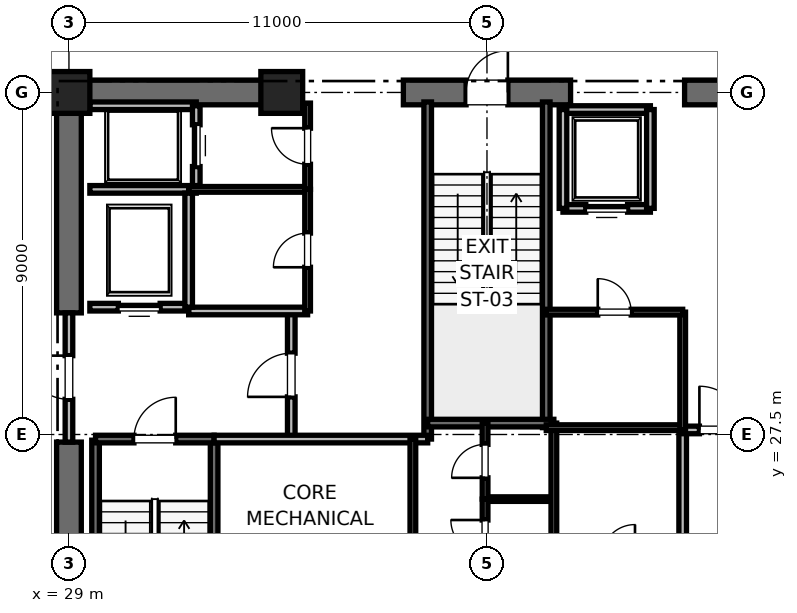
"""IFC4 building model, lengths in metres.
Left out: names, types, materials, properties, quantities, classifications, styles, units other than length and angle.
Written with IfcOpenShell. Run it as: python <this file> out.ifc"""

import sys

from ifc_helpers import new_model, si_unit, direction, frame, frame_2d, origin, origin_2d, place, context, subcontext, project, spatial, rectangle, extrude, element, fill, save


model = new_model("IFC4")
c1 = context("Model", 3, precision=1e-05, world=origin(), true_north=direction((0.0, 1.0)))
c2 = subcontext(c1, "Body", "Model", "MODEL_VIEW")
j1 = project(units=[si_unit("LENGTHUNIT", "METRE"), si_unit("PLANEANGLEUNIT", "RADIAN")], contexts=[c1])
p1 = place(None, origin())
s1 = spatial("IfcSite", under=j1, at=p1, CompositionType="ELEMENT")
p2 = place(p1, origin())
s2 = spatial("IfcBuilding", under=s1, at=p2, CompositionType="ELEMENT")
p3 = place(p2, frame((0.0, 0.0, -9.0)))
s3 = spatial("IfcBuildingStorey", under=s2, at=p3, CompositionType="ELEMENT", Elevation=-9.0)
for number, where, z_axis, x_axis in (
    (1, (29.0, 36.5, -0.3), (0.0, 0.0, 1.0), (1.0, 0.0, 0.0)),
    (2, (34.6, 36.5, -0.3), (0.0, 0.0, 1.0), (1.0, 0.0, 0.0)),
):
    element("IfcColumn", number, at=place(p3, frame(where, z_axis=z_axis, x_axis=x_axis)), inside=s3, PredefinedType="PILASTER", context=c2, shape_type="SweptSolid", body=[
        extrude(rectangle(XDim=1.1, YDim=1.1, at=origin_2d()), origin(), (0.0, 0.0, 1.0), 4.8),
    ])
p4 = place(p3, frame((29.0, 36.5, -0.3), z_axis=(0.0, 0.0, 1.0), x_axis=(1.0, 0.0, 0.0)))
e3 = element("IfcWall", 3, at=p4, inside=s3, PredefinedType="SHEAR", context=c2, shape_type="SweptSolid", body=[
    extrude(rectangle(XDim=5.8, YDim=0.65, at=frame_2d((2.9, 0.0))), origin(), (0.0, 0.0, 1.0), 4.5),
])
p5 = place(p3, frame((37.8, 36.5, -0.3), z_axis=(0.0, 0.0, 1.0), x_axis=(1.0, 0.0, 0.0)))
e4 = element("IfcWall", 4, at=p5, inside=s3, PredefinedType="SHEAR", context=c2, shape_type="SweptSolid", body=[
    extrude(rectangle(XDim=4.4, YDim=0.65, at=frame_2d((2.2, 0.0))), origin(), (0.0, 0.0, 1.0), 4.5),
])
p6 = place(p5, frame((1.65, 0.0, 0.3)))
e5 = element("IfcOpeningElement", 5, at=p6, cuts=e4, PredefinedType="OPENING", context=c2, shape_type="SweptSolid", body=[
    extrude(rectangle(XDim=1.1, YDim=2.15, at=frame_2d((0.55, 1.075))), frame((0.0, 0.325, 0.0), z_axis=(0.0, -1.0, 0.0), x_axis=(1.0, 0.0, 0.0)), (0.0, 0.0, 1.0), 0.65),
])
p7 = place(p3, frame((45.2, 36.5, -0.3), z_axis=(0.0, 0.0, 1.0), x_axis=(1.0, 0.0, 0.0)))
e6 = element("IfcWall", 6, at=p7, inside=s3, PredefinedType="SHEAR", context=c2, shape_type="SweptSolid", body=[
    extrude(rectangle(XDim=5.8, YDim=0.65, at=frame_2d((2.9, 0.0))), origin(), (0.0, 0.0, 1.0), 4.5),
])
p8 = place(p3, frame((29.0, 18.5, -0.3), z_axis=(0.0, 0.0, 1.0), x_axis=(0.0, 1.0, 0.0)))
e7 = element("IfcWall", 7, at=p8, inside=s3, PredefinedType="SHEAR", context=c2, shape_type="SweptSolid", body=[
    extrude(rectangle(XDim=8.8, YDim=0.65, at=frame_2d((4.4, 0.0))), origin(), (0.0, 0.0, 1.0), 4.5),
])
p9 = place(p3, frame((29.0, 30.7, -0.3), z_axis=(0.0, 0.0, 1.0), x_axis=(0.0, 1.0, 0.0)))
e8 = element("IfcWall", 8, at=p9, inside=s3, PredefinedType="SHEAR", context=c2, shape_type="SweptSolid", body=[
    extrude(rectangle(XDim=5.8, YDim=0.65, at=frame_2d((2.9, 0.0))), origin(), (0.0, 0.0, 1.0), 4.5),
])
p10 = place(p3, frame((29.7, 19.2, -0.3), z_axis=(0.0, 0.0, 1.0), x_axis=(0.0, 1.0, 0.0)))
e9 = element("IfcWall", 9, at=p10, inside=s3, PredefinedType="SOLIDWALL", context=c2, shape_type="SweptSolid", body=[
    extrude(rectangle(XDim=8.15, YDim=0.2, at=frame_2d((4.075, 0.0))), origin(), (0.0, 0.0, 1.0), 4.5),
])
p11 = place(p3, frame((32.82, 18.6, -0.3), z_axis=(0.0, 0.0, 1.0), x_axis=(0.0, 1.0, 0.0)))
e10 = element("IfcWall", 10, at=p11, inside=s3, PredefinedType="SOLIDWALL", context=c2, shape_type="SweptSolid", body=[
    extrude(rectangle(XDim=8.78, YDim=0.2, at=frame_2d((4.39, 0.0))), origin(), (0.0, 0.0, 1.0), 4.5),
])
p12 = place(p3, frame((29.7, 27.38, -0.3), z_axis=(0.0, 0.0, 1.0), x_axis=(1.0, 0.0, 0.0)))
e11 = element("IfcWall", 11, at=p12, inside=s3, PredefinedType="SOLIDWALL", context=c2, shape_type="SweptSolid", body=[
    extrude(rectangle(XDim=3.12, YDim=0.2, at=frame_2d((1.56, 0.0))), origin(), (0.0, 0.0, 1.0), 4.5),
])
p13 = place(p12, frame((1.01, 0.0, 0.3)))
e12 = element("IfcOpeningElement", 12, at=p13, cuts=e11, PredefinedType="OPENING", context=c2, shape_type="SweptSolid", body=[
    extrude(rectangle(XDim=1.1, YDim=2.15, at=frame_2d((0.55, 1.075))), frame((0.0, 0.1, 0.0), z_axis=(0.0, -1.0, 0.0), x_axis=(1.0, 0.0, 0.0)), (0.0, 0.0, 1.0), 0.2),
])
p14 = place(p3, frame((38.44, 27.38, -0.3), z_axis=(0.0, 0.0, 1.0), x_axis=(0.0, 1.0, 0.0)))
e13 = element("IfcWall", 13, at=p14, inside=s3, PredefinedType="SOLIDWALL", context=c2, shape_type="SweptSolid", body=[
    extrude(rectangle(XDim=8.87, YDim=0.2, at=frame_2d((4.435, 0.0))), origin(), (0.0, 0.0, 1.0), 4.5),
])
p15 = place(p3, frame((41.56, 27.68, -0.3), z_axis=(0.0, 0.0, 1.0), x_axis=(0.0, 1.0, 0.0)))
e14 = element("IfcWall", 14, at=p15, inside=s3, PredefinedType="SOLIDWALL", context=c2, shape_type="SweptSolid", body=[
    extrude(rectangle(XDim=8.57, YDim=0.2, at=frame_2d((4.285, 0.0))), origin(), (0.0, 0.0, 1.0), 4.5),
])
p16 = place(p3, frame((38.44, 27.8, -0.3), z_axis=(0.0, 0.0, 1.0), x_axis=(1.0, 0.0, 0.0)))
e15 = element("IfcWall", 15, at=p16, inside=s3, PredefinedType="SOLIDWALL", context=c2, shape_type="SweptSolid", body=[
    extrude(rectangle(XDim=3.32, YDim=0.2, at=frame_2d((1.66, 0.0))), origin(), (0.0, 0.0, 1.0), 4.5),
])
p17 = place(p3, frame((34.85, 27.38, 0.0), z_axis=(0.0, 0.0, 1.0), x_axis=(0.0, 1.0, 0.0)))
e16 = element("IfcWall", 16, at=p17, inside=s3, PredefinedType="PARTITIONING", context=c2, shape_type="SweptSolid", body=[
    extrude(rectangle(XDim=3.37, YDim=0.2, at=frame_2d((1.685, 0.0))), origin(), (0.0, 0.0, 1.0), 4.2),
])
p18 = place(p17, frame((1.11, 0.0, 0.0)))
e17 = element("IfcOpeningElement", 17, at=p18, cuts=e16, PredefinedType="OPENING", context=c2, shape_type="SweptSolid", body=[
    extrude(rectangle(XDim=1.15, YDim=2.2, at=frame_2d((0.575, 1.1))), frame((0.0, 0.1, 0.0), z_axis=(0.0, -1.0, 0.0), x_axis=(1.0, 0.0, 0.0)), (0.0, 0.0, 1.0), 0.2),
])
p19 = place(p3, frame((29.0, 27.3, 0.0), z_axis=(0.0, 0.0, 1.0), x_axis=(0.0, 1.0, 0.0)))
e18 = element("IfcWall", 18, at=p19, inside=s3, PredefinedType="PARTITIONING", context=c2, shape_type="SweptSolid", body=[
    extrude(rectangle(XDim=3.4, YDim=0.2, at=frame_2d((1.7, 0.0))), origin(), (0.0, 0.0, 1.0), 2.98),
])
p20 = place(p19, frame((1.125, 0.0, 0.0)))
e19 = element("IfcOpeningElement", 19, at=p20, cuts=e18, PredefinedType="OPENING", context=c2, shape_type="SweptSolid", body=[
    extrude(rectangle(XDim=1.15, YDim=2.2, at=frame_2d((0.575, 1.1))), frame((0.0, 0.1, 0.0), z_axis=(0.0, -1.0, 0.0), x_axis=(1.0, 0.0, 0.0)), (0.0, 0.0, 1.0), 0.2),
])
p21 = place(p3, frame((32.82, 27.38, 0.0), z_axis=(0.0, 0.0, 1.0), x_axis=(1.0, 0.0, 0.0)))
e20 = element("IfcWall", 20, at=p21, inside=s3, PredefinedType="PARTITIONING", context=c2, shape_type="SweptSolid", body=[
    extrude(rectangle(XDim=5.62, YDim=0.2, at=frame_2d((2.81, 0.0))), origin(), (0.0, 0.0, 1.0), 4.2),
])
p22 = place(p3, frame((32.15, 30.75, 0.0), z_axis=(0.0, 0.0, 1.0), x_axis=(1.0, 0.0, 0.0)))
e21 = element("IfcWall", 21, at=p22, inside=s3, PredefinedType="PARTITIONING", context=c2, shape_type="SweptSolid", body=[
    extrude(rectangle(XDim=3.13, YDim=0.2, at=frame_2d((1.565, 0.0))), origin(), (0.0, 0.0, 1.0), 4.2),
])
p23 = place(p3, frame((45.15, 24.25, 0.0), z_axis=(0.0, 0.0, 1.0), x_axis=(0.0, 1.0, 0.0)))
e22 = element("IfcWall", 22, at=p23, inside=s3, PredefinedType="PARTITIONING", context=c2, shape_type="SweptSolid", body=[
    extrude(rectangle(XDim=3.37, YDim=0.2, at=frame_2d((1.685, 0.0))), origin(), (0.0, 0.0, 1.0), 4.2),
])
p24 = place(p3, frame((45.15, 27.62, 0.0), z_axis=(0.0, 0.0, 1.0), x_axis=(1.0, 0.0, 0.0)))
e23 = element("IfcWall", 23, at=p24, inside=s3, PredefinedType="PARTITIONING", context=c2, shape_type="SweptSolid", body=[
    extrude(rectangle(XDim=2.03, YDim=0.2, at=frame_2d((1.015, 0.0))), origin(), (0.0, 0.0, 1.0), 4.2),
])
p25 = place(p24, frame((0.44, 0.0, 0.0)))
e24 = element("IfcOpeningElement", 24, at=p25, cuts=e23, PredefinedType="OPENING", context=c2, shape_type="SweptSolid", body=[
    extrude(rectangle(XDim=1.15, YDim=2.2, at=frame_2d((0.575, 1.1))), frame((0.0, 0.1, 0.0), z_axis=(0.0, -1.0, 0.0), x_axis=(1.0, 0.0, 0.0)), (0.0, 0.0, 1.0), 0.2),
])
p26 = place(p3, frame((29.55, 30.85, 0.0), z_axis=(0.0, 0.0, 1.0), x_axis=(1.0, 0.0, 0.0)))
e25 = element("IfcWall", 25, at=p26, inside=s3, PredefinedType="SOLIDWALL", context=c2, shape_type="SweptSolid", body=[
    extrude(rectangle(XDim=2.6, YDim=0.2, at=frame_2d((1.3, 0.0))), origin(), (0.0, 0.0, 1.0), 2.98),
])
p27 = place(p26, frame((0.75, 0.0, 0.0)))
e26 = element("IfcOpeningElement", 26, at=p27, cuts=e25, PredefinedType="OPENING", context=c2, shape_type="SweptSolid", body=[
    extrude(rectangle(XDim=1.1, YDim=2.2, at=frame_2d((0.55, 1.1))), frame((0.0, 0.1, 0.0), z_axis=(0.0, -1.0, 0.0), x_axis=(1.0, 0.0, 0.0)), (0.0, 0.0, 1.0), 0.2),
])
p28 = place(p3, frame((29.55, 33.95, 0.0), z_axis=(0.0, 0.0, 1.0), x_axis=(1.0, 0.0, 0.0)))
e27 = element("IfcWall", 27, at=p28, inside=s3, PredefinedType="SOLIDWALL", context=c2, shape_type="SweptSolid", body=[
    extrude(rectangle(XDim=2.8, YDim=0.2, at=frame_2d((1.4, 0.0))), origin(), (0.0, 0.0, 1.0), 4.2),
])
p29 = place(p3, frame((32.15, 30.85, 0.0), z_axis=(0.0, 0.0, 1.0), x_axis=(0.0, 1.0, 0.0)))
e28 = element("IfcWall", 28, at=p29, inside=s3, PredefinedType="SOLIDWALL", context=c2, shape_type="SweptSolid", body=[
    extrude(rectangle(XDim=3.0, YDim=0.2, at=frame_2d((1.5, 0.0))), origin(), (0.0, 0.0, 1.0), 4.2),
])
p30 = place(p3, frame((32.35, 36.15, 0.0), z_axis=(0.0, 0.0, 1.0), x_axis=(-1.0, 0.0, 0.0)))
e29 = element("IfcWall", 29, at=p30, inside=s3, PredefinedType="SOLIDWALL", context=c2, shape_type="SweptSolid", body=[
    extrude(rectangle(XDim=2.8, YDim=0.2, at=frame_2d((1.4, 0.0))), origin(), (0.0, 0.0, 1.0), 3.38),
])
p31 = place(p3, frame((32.35, 34.05, 0.0), z_axis=(0.0, 0.0, 1.0), x_axis=(0.0, 1.0, 0.0)))
e30 = element("IfcWall", 30, at=p31, inside=s3, PredefinedType="SOLIDWALL", context=c2, shape_type="SweptSolid", body=[
    extrude(rectangle(XDim=2.1, YDim=0.2, at=frame_2d((1.05, 0.0))), origin(), (0.0, 0.0, 1.0), 4.2),
])
p32 = place(p31, frame((0.5, 0.0, 0.0)))
e31 = element("IfcOpeningElement", 31, at=p32, cuts=e30, PredefinedType="OPENING", context=c2, shape_type="SweptSolid", body=[
    extrude(rectangle(XDim=1.1, YDim=2.2, at=frame_2d((0.55, 1.1))), frame((0.0, 0.1, 0.0), z_axis=(0.0, -1.0, 0.0), x_axis=(1.0, 0.0, 0.0)), (0.0, 0.0, 1.0), 0.2),
])
p33 = place(p3, frame((42.0, 33.45, 0.0), z_axis=(0.0, 0.0, 1.0), x_axis=(1.0, 0.0, 0.0)))
e32 = element("IfcWall", 32, at=p33, inside=s3, PredefinedType="SOLIDWALL", context=c2, shape_type="SweptSolid", body=[
    extrude(rectangle(XDim=2.3, YDim=0.2, at=frame_2d((1.15, 0.0))), origin(), (0.0, 0.0, 1.0), 4.2),
])
p34 = place(p33, frame((0.6, 0.0, 0.0)))
e33 = element("IfcOpeningElement", 33, at=p34, cuts=e32, PredefinedType="OPENING", context=c2, shape_type="SweptSolid", body=[
    extrude(rectangle(XDim=1.1, YDim=2.2, at=frame_2d((0.55, 1.1))), frame((0.0, 0.1, 0.0), z_axis=(0.0, -1.0, 0.0), x_axis=(1.0, 0.0, 0.0)), (0.0, 0.0, 1.0), 0.2),
])
p35 = place(p3, frame((44.3, 36.05, 0.0), z_axis=(0.0, 0.0, 1.0), x_axis=(-1.0, 0.0, 0.0)))
e34 = element("IfcWall", 34, at=p35, inside=s3, PredefinedType="SOLIDWALL", context=c2, shape_type="SweptSolid", body=[
    extrude(rectangle(XDim=2.3, YDim=0.2, at=frame_2d((1.15, 0.0))), origin(), (0.0, 0.0, 1.0), 2.98),
])
for number, where, z_axis, x_axis in (
    (35, (42.0, 36.05, 0.0), (0.0, 0.0, 1.0), (0.0, -1.0, 0.0)),
    (36, (44.3, 33.45, 0.0), (0.0, 0.0, 1.0), (0.0, 1.0, 0.0)),
):
    element("IfcWall", number, at=place(p3, frame(where, z_axis=z_axis, x_axis=x_axis)), inside=s3, PredefinedType="SOLIDWALL", context=c2, shape_type="SweptSolid", body=[
        extrude(rectangle(XDim=2.6, YDim=0.2, at=frame_2d((1.3, 0.0))), origin(), (0.0, 0.0, 1.0), 2.98),
    ])
p36 = place(p3, frame((39.95, 25.8, 0.0), z_axis=(0.0, 0.0, 1.0), x_axis=(1.0, 0.0, 0.0)))
e37 = element("IfcWall", 37, at=p36, inside=s3, PredefinedType="PARTITIONING", context=c2, shape_type="SweptSolid", body=[
    extrude(rectangle(XDim=1.81, YDim=0.12, at=frame_2d((0.905, 0.0))), origin(), (0.0, 0.0, 1.0), 2.85),
])
p37 = place(p3, frame((41.76, 23.8, 0.0), z_axis=(0.0, 0.0, 1.0), x_axis=(0.0, 1.0, 0.0)))
e38 = element("IfcWall", 38, at=p37, inside=s3, PredefinedType="PARTITIONING", context=c2, shape_type="SweptSolid", body=[
    extrude(rectangle(XDim=4.0, YDim=0.15, at=frame_2d((2.0, 0.0))), origin(), (0.0, 0.0, 1.0), 2.85),
])
p38 = place(p3, frame((39.95, 23.8, 0.0), z_axis=(0.0, 0.0, 1.0), x_axis=(0.0, 1.0, 0.0)))
e39 = element("IfcWall", 39, at=p38, inside=s3, PredefinedType="PARTITIONING", context=c2, shape_type="SweptSolid", body=[
    extrude(rectangle(XDim=2.0, YDim=0.15, at=frame_2d((1.0, 0.0))), origin(), (0.0, 0.0, 1.0), 2.85),
])
p39 = place(p38, frame((0.55, 0.0, 0.0)))
e40 = element("IfcOpeningElement", 40, at=p39, cuts=e39, PredefinedType="OPENING", context=c2, shape_type="SweptSolid", body=[
    extrude(rectangle(XDim=0.9, YDim=2.1, at=frame_2d((0.45, 1.05))), frame((0.0, 0.075, 0.0), z_axis=(0.0, -1.0, 0.0), x_axis=(1.0, 0.0, 0.0)), (0.0, 0.0, 1.0), 0.15),
])
p40 = place(p3, frame((39.95, 25.8, 0.0), z_axis=(0.0, 0.0, 1.0), x_axis=(0.0, 1.0, 0.0)))
e41 = element("IfcWall", 41, at=p40, inside=s3, PredefinedType="PARTITIONING", context=c2, shape_type="SweptSolid", body=[
    extrude(rectangle(XDim=2.0, YDim=0.15, at=frame_2d((1.0, 0.0))), origin(), (0.0, 0.0, 1.0), 2.85),
])
p41 = place(p40, frame((0.56, 0.0, 0.0)))
e42 = element("IfcOpeningElement", 42, at=p41, cuts=e41, PredefinedType="OPENING", context=c2, shape_type="SweptSolid", body=[
    extrude(rectangle(XDim=0.88, YDim=2.1, at=frame_2d((0.44, 1.05))), frame((0.0, 0.075, 0.0), z_axis=(0.0, -1.0, 0.0), x_axis=(1.0, 0.0, 0.0)), (0.0, 0.0, 1.0), 0.15),
])
p42 = place(p3, frame((32.15, 33.95, 0.0), z_axis=(0.0, 0.0, 1.0), x_axis=(1.0, 0.0, 0.0)))
e43 = element("IfcWall", 43, at=p42, inside=s3, PredefinedType="PARTITIONING", context=c2, shape_type="SweptSolid", body=[
    extrude(rectangle(XDim=3.13, YDim=0.15, at=frame_2d((1.565, 0.0))), origin(), (0.0, 0.0, 1.0), 2.85),
])
p43 = place(p3, frame((35.28, 33.95, 0.0), z_axis=(0.0, 0.0, 1.0), x_axis=(0.0, 1.0, 0.0)))
e44 = element("IfcWall", 44, at=p43, inside=s3, PredefinedType="PARTITIONING", context=c2, shape_type="SweptSolid", body=[
    extrude(rectangle(XDim=2.27, YDim=0.15, at=frame_2d((1.135, 0.0))), origin(), (0.0, 0.0, 1.0), 2.85),
])
p44 = place(p43, frame((0.66, 0.0, 0.0)))
e45 = element("IfcOpeningElement", 45, at=p44, cuts=e44, PredefinedType="OPENING", context=c2, shape_type="SweptSolid", body=[
    extrude(rectangle(XDim=0.95, YDim=2.15, at=frame_2d((0.475, 1.075))), frame((0.0, 0.075, 0.0), z_axis=(0.0, -1.0, 0.0), x_axis=(1.0, 0.0, 0.0)), (0.0, 0.0, 1.0), 0.15),
])
p45 = place(p3, frame((35.28, 30.75, 0.0), z_axis=(0.0, 0.0, 1.0), x_axis=(0.0, 1.0, 0.0)))
e46 = element("IfcWall", 46, at=p45, inside=s3, PredefinedType="PARTITIONING", context=c2, shape_type="SweptSolid", body=[
    extrude(rectangle(XDim=3.2, YDim=0.15, at=frame_2d((1.6, 0.0))), origin(), (0.0, 0.0, 1.0), 2.85),
])
p46 = place(p45, frame((1.15, 0.0, 0.0)))
e47 = element("IfcOpeningElement", 47, at=p46, cuts=e46, PredefinedType="OPENING", context=c2, shape_type="SweptSolid", body=[
    extrude(rectangle(XDim=0.9, YDim=2.1, at=frame_2d((0.45, 1.05))), frame((0.0, 0.075, 0.0), z_axis=(0.0, -1.0, 0.0), x_axis=(1.0, 0.0, 0.0)), (0.0, 0.0, 1.0), 0.15),
])
p47 = place(p3, frame((38.05, 18.6, 0.0), z_axis=(0.0, 0.0, 1.0), x_axis=(0.0, 1.0, 0.0)))
e48 = element("IfcWall", 48, at=p47, inside=s3, PredefinedType="PARTITIONING", context=c2, shape_type="SweptSolid", body=[
    extrude(rectangle(XDim=8.78, YDim=0.15, at=frame_2d((4.39, 0.0))), origin(), (0.0, 0.0, 1.0), 2.85),
])
p48 = place(p47, frame((3.95, 0.0, 0.0)))
e49 = element("IfcOpeningElement", 49, at=p48, cuts=e48, PredefinedType="OPENING", context=c2, shape_type="SweptSolid", body=[
    extrude(rectangle(XDim=0.88, YDim=2.1, at=frame_2d((0.44, 1.05))), frame((0.0, 0.075, 0.0), z_axis=(0.0, -1.0, 0.0), x_axis=(1.0, 0.0, 0.0)), (0.0, 0.0, 1.0), 0.15),
])
p49 = place(p3, frame((41.56, 27.68, 0.0), z_axis=(0.0, 0.0, 1.0), x_axis=(1.0, 0.0, 0.0)))
e50 = element("IfcWall", 50, at=p49, inside=s3, PredefinedType="PARTITIONING", context=c2, shape_type="SweptSolid", body=[
    extrude(rectangle(XDim=3.59, YDim=0.15, at=frame_2d((1.795, 0.0))), origin(), (0.0, 0.0, 1.0), 2.85),
])
p50 = place(p3, frame((45.15, 27.62, 0.0), z_axis=(0.0, 0.0, 1.0), x_axis=(0.0, 1.0, 0.0)))
e51 = element("IfcWall", 51, at=p50, inside=s3, PredefinedType="PARTITIONING", context=c2, shape_type="SweptSolid", body=[
    extrude(rectangle(XDim=3.1, YDim=0.15, at=frame_2d((1.55, 0.0))), origin(), (0.0, 0.0, 1.0), 2.85),
])
p51 = place(p3, frame((41.56, 30.72, 0.0), z_axis=(0.0, 0.0, 1.0), x_axis=(1.0, 0.0, 0.0)))
e52 = element("IfcWall", 52, at=p51, inside=s3, PredefinedType="PARTITIONING", context=c2, shape_type="SweptSolid", body=[
    extrude(rectangle(XDim=3.59, YDim=0.15, at=frame_2d((1.795, 0.0))), origin(), (0.0, 0.0, 1.0), 2.85),
])
p52 = place(p51, frame((1.355, 0.0, 0.0)))
e53 = element("IfcOpeningElement", 53, at=p52, cuts=e52, PredefinedType="OPENING", context=c2, shape_type="SweptSolid", body=[
    extrude(rectangle(XDim=0.88, YDim=2.1, at=frame_2d((0.44, 1.05))), frame((0.0, 0.075, 0.0), z_axis=(0.0, -1.0, 0.0), x_axis=(1.0, 0.0, 0.0)), (0.0, 0.0, 1.0), 0.15),
])
p53 = place(p13, origin())
e54 = element("IfcDoor", 54, at=p53, inside=s3, OperationType="SINGLE_SWING_RIGHT", PredefinedType="DOOR", context=c2, shape_type="SweptSolid", body=[
    extrude(rectangle(XDim=1.1, YDim=2.15, at=frame_2d((0.55, 1.075))), frame((0.0, 0.025, 0.0), z_axis=(0.0, -1.0, 0.0), x_axis=(1.0, 0.0, 0.0)), (0.0, 0.0, 1.0), 0.05),
])
fill(e12, e54)
p54 = place(p6, origin())
e55 = element("IfcDoor", 55, at=p54, inside=s3, OperationType="SINGLE_SWING_RIGHT", PredefinedType="DOOR", context=c2, shape_type="SweptSolid", body=[
    extrude(rectangle(XDim=1.1, YDim=2.15, at=frame_2d((0.55, 1.075))), frame((0.0, 0.025, 0.0), z_axis=(0.0, -1.0, 0.0), x_axis=(1.0, 0.0, 0.0)), (0.0, 0.0, 1.0), 0.05),
])
fill(e5, e55)
p55 = place(p18, origin())
e56 = element("IfcDoor", 56, at=p55, inside=s3, OperationType="SINGLE_SWING_LEFT", PredefinedType="DOOR", context=c2, shape_type="SweptSolid", body=[
    extrude(rectangle(XDim=1.15, YDim=2.2, at=frame_2d((0.575, 1.1))), frame((0.0, 0.025, 0.0), z_axis=(0.0, -1.0, 0.0), x_axis=(1.0, 0.0, 0.0)), (0.0, 0.0, 1.0), 0.05),
])
fill(e17, e56)
p56 = place(p20, origin())
e57 = element("IfcDoor", 57, at=p56, inside=s3, OperationType="SINGLE_SWING_RIGHT", PredefinedType="DOOR", context=c2, shape_type="SweptSolid", body=[
    extrude(rectangle(XDim=1.15, YDim=2.2, at=frame_2d((0.575, 1.1))), frame((0.0, 0.025, 0.0), z_axis=(0.0, -1.0, 0.0), x_axis=(1.0, 0.0, 0.0)), (0.0, 0.0, 1.0), 0.05),
])
fill(e19, e57)
p57 = place(p25, origin())
e58 = element("IfcDoor", 58, at=p57, inside=s3, OperationType="SINGLE_SWING_LEFT", PredefinedType="DOOR", context=c2, shape_type="SweptSolid", body=[
    extrude(rectangle(XDim=1.15, YDim=2.2, at=frame_2d((0.575, 1.1))), frame((0.0, 0.025, 0.0), z_axis=(0.0, -1.0, 0.0), x_axis=(1.0, 0.0, 0.0)), (0.0, 0.0, 1.0), 0.05),
])
fill(e24, e58)
p58 = place(p27, origin())
e59 = element("IfcDoor", 59, at=p58, inside=s3, OperationType="SLIDING_TO_RIGHT", PredefinedType="DOOR", context=c2, shape_type="SweptSolid", body=[
    extrude(rectangle(XDim=1.1, YDim=2.2, at=frame_2d((0.55, 1.1))), frame((0.0, 0.025, 0.0), z_axis=(0.0, -1.0, 0.0), x_axis=(1.0, 0.0, 0.0)), (0.0, 0.0, 1.0), 0.05),
])
fill(e26, e59)
p59 = place(p32, origin())
e60 = element("IfcDoor", 60, at=p59, inside=s3, OperationType="SLIDING_TO_RIGHT", PredefinedType="DOOR", context=c2, shape_type="SweptSolid", body=[
    extrude(rectangle(XDim=1.1, YDim=2.2, at=frame_2d((0.55, 1.1))), frame((0.0, 0.025, 0.0), z_axis=(0.0, -1.0, 0.0), x_axis=(1.0, 0.0, 0.0)), (0.0, 0.0, 1.0), 0.05),
])
fill(e31, e60)
p60 = place(p34, origin())
e61 = element("IfcDoor", 61, at=p60, inside=s3, OperationType="SLIDING_TO_RIGHT", PredefinedType="DOOR", context=c2, shape_type="SweptSolid", body=[
    extrude(rectangle(XDim=1.1, YDim=2.2, at=frame_2d((0.55, 1.1))), frame((0.0, 0.025, 0.0), z_axis=(0.0, -1.0, 0.0), x_axis=(1.0, 0.0, 0.0)), (0.0, 0.0, 1.0), 0.05),
])
fill(e33, e61)
p61 = place(p39, origin())
e62 = element("IfcDoor", 62, at=p61, inside=s3, OperationType="SINGLE_SWING_RIGHT", PredefinedType="DOOR", context=c2, shape_type="SweptSolid", body=[
    extrude(rectangle(XDim=0.9, YDim=2.1, at=frame_2d((0.45, 1.05))), frame((0.0, 0.025, 0.0), z_axis=(0.0, -1.0, 0.0), x_axis=(1.0, 0.0, 0.0)), (0.0, 0.0, 1.0), 0.05),
])
fill(e40, e62)
p62 = place(p41, origin())
e63 = element("IfcDoor", 63, at=p62, inside=s3, OperationType="SINGLE_SWING_LEFT", PredefinedType="DOOR", context=c2, shape_type="SweptSolid", body=[
    extrude(rectangle(XDim=0.88, YDim=2.1, at=frame_2d((0.44, 1.05))), frame((0.0, 0.025, 0.0), z_axis=(0.0, -1.0, 0.0), x_axis=(1.0, 0.0, 0.0)), (0.0, 0.0, 1.0), 0.05),
])
fill(e42, e63)
p63 = place(p44, origin())
e64 = element("IfcDoor", 64, at=p63, inside=s3, OperationType="SINGLE_SWING_RIGHT", PredefinedType="DOOR", context=c2, shape_type="SweptSolid", body=[
    extrude(rectangle(XDim=0.95, YDim=2.15, at=frame_2d((0.475, 1.075))), frame((0.0, 0.025, 0.0), z_axis=(0.0, -1.0, 0.0), x_axis=(1.0, 0.0, 0.0)), (0.0, 0.0, 1.0), 0.05),
])
fill(e45, e64)
p64 = place(p46, origin())
e65 = element("IfcDoor", 65, at=p64, inside=s3, OperationType="SINGLE_SWING_LEFT", PredefinedType="DOOR", context=c2, shape_type="SweptSolid", body=[
    extrude(rectangle(XDim=0.9, YDim=2.1, at=frame_2d((0.45, 1.05))), frame((0.0, 0.025, 0.0), z_axis=(0.0, -1.0, 0.0), x_axis=(1.0, 0.0, 0.0)), (0.0, 0.0, 1.0), 0.05),
])
fill(e47, e65)
p65 = place(p52, origin())
e66 = element("IfcDoor", 66, at=p65, inside=s3, OperationType="SINGLE_SWING_LEFT", PredefinedType="DOOR", context=c2, shape_type="SweptSolid", body=[
    extrude(rectangle(XDim=0.88, YDim=2.1, at=frame_2d((0.44, 1.05))), frame((0.0, 0.025, 0.0), z_axis=(0.0, -1.0, 0.0), x_axis=(1.0, 0.0, 0.0)), (0.0, 0.0, 1.0), 0.05),
])
fill(e53, e66)
save(model, sys.argv[1])
